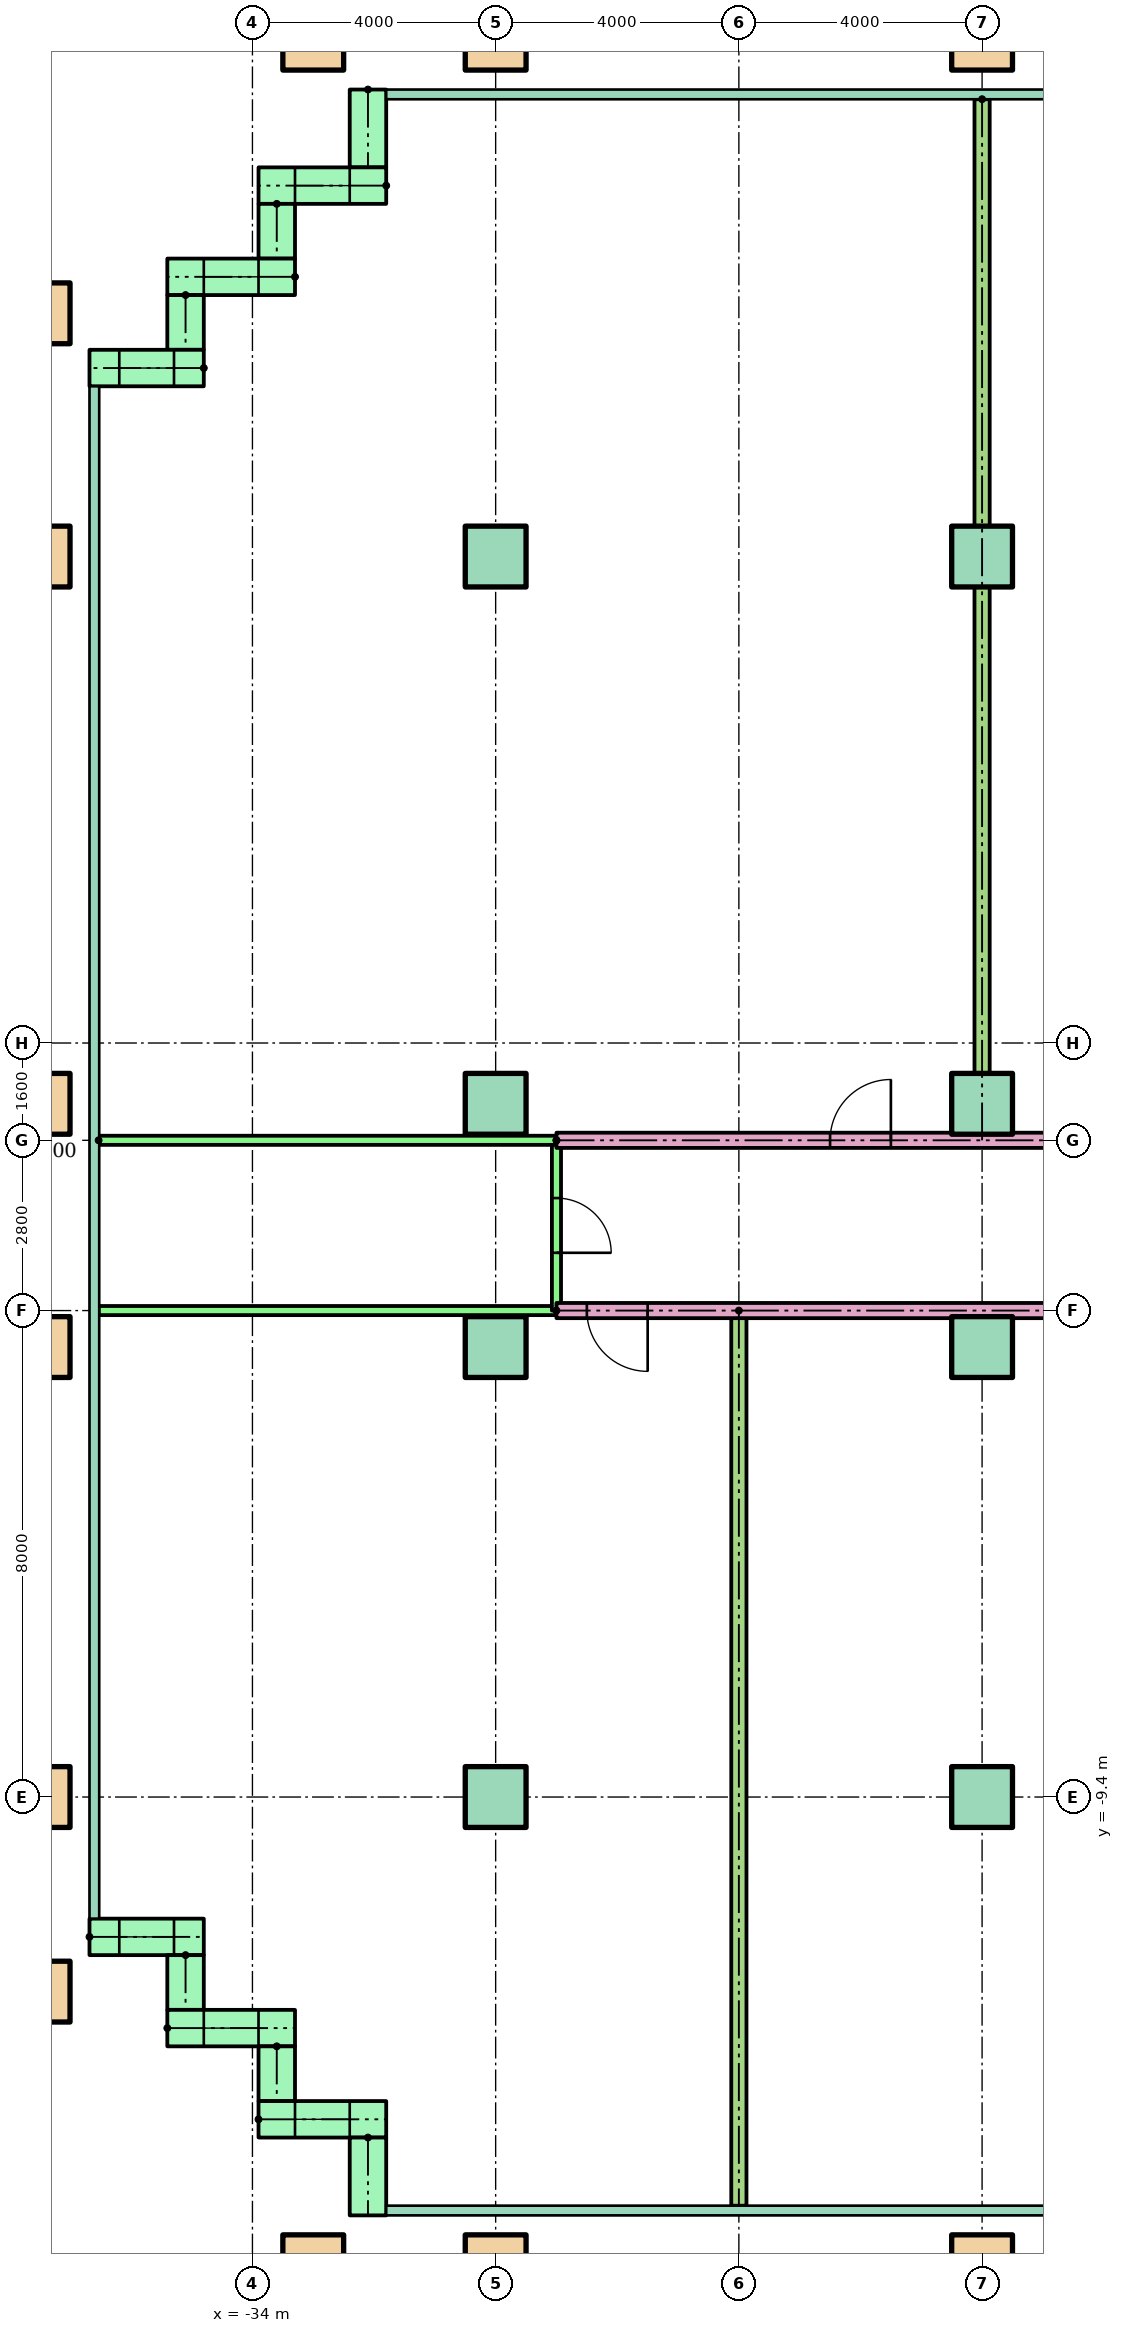
"""IFC4 building model, lengths in metres.
Left out: names, types, materials, properties, quantities, classifications, styles, units other than length and angle.
Written with IfcOpenShell. Run it as: python <this file> out.ifc"""

import sys

from ifc_helpers import new_model, si_unit, direction, frame, frame_2d, origin, origin_2d, place, context, subcontext, project, spatial, rectangle, hollow_rectangle, extrude, element, fill, save


model = new_model("IFC4")
c1 = context("Model", 3, precision=1e-05, world=origin(), true_north=direction((0.0, 1.0)))
c2 = subcontext(c1, "Body", "Model", "MODEL_VIEW")
j1 = project(units=[si_unit("LENGTHUNIT", "METRE"), si_unit("PLANEANGLEUNIT", "RADIAN")], contexts=[c1])
p1 = place(None, origin())
s1 = spatial("IfcSite", under=j1, at=p1, CompositionType="ELEMENT")
p2 = place(p1, origin())
s2 = spatial("IfcBuilding", under=s1, at=p2, CompositionType="ELEMENT")
p3 = place(p2, frame((0.0, 0.0, 29.9)))
s3 = spatial("IfcBuildingStorey", under=s2, at=p3, CompositionType="ELEMENT", Elevation=29.9)
for number, where in (
    (1, (-33.0, -17.1, 0.0)),
    (2, (-30.0, -17.1, 0.0)),
    (3, (-22.0, -17.1, 0.0)),
    (4, (-37.5, -12.6, 0.0)),
    (5, (-37.5, -9.4, 0.0)),
):
    element("IfcColumn", number, at=place(p3, frame(where)), inside=s3, PredefinedType="COLUMN", context=c2, shape_type="SweptSolid", body=[
        extrude(hollow_rectangle(XDim=1.0, YDim=1.0, WallThickness=0.05, at=origin_2d()), origin(), (0.0, 0.0, 1.0), 3.9),
    ])
for number, where in (
    (6, (-30.0, -9.4, 0.0)),
    (7, (-22.0, -9.4, 0.0)),
):
    element("IfcColumn", number, at=place(p3, frame(where)), inside=s3, PredefinedType="COLUMN", context=c2, shape_type="SweptSolid", body=[
        extrude(rectangle(XDim=1.0, YDim=1.0, at=origin_2d()), origin(), (0.0, 0.0, 1.0), 3.9),
    ])
p4 = place(p3, frame((-37.5, -2.0, 0.0)))
e8 = element("IfcColumn", 8, at=p4, inside=s3, PredefinedType="COLUMN", context=c2, shape_type="SweptSolid", body=[
    extrude(hollow_rectangle(XDim=1.0, YDim=1.0, WallThickness=0.05, at=origin_2d()), origin(), (0.0, 0.0, 1.0), 3.9),
])
for number, where in (
    (9, (-30.0, -2.0, 0.0)),
    (10, (-22.0, -2.0, 0.0)),
):
    element("IfcColumn", number, at=place(p3, frame(where)), inside=s3, PredefinedType="COLUMN", context=c2, shape_type="SweptSolid", body=[
        extrude(rectangle(XDim=1.0, YDim=1.0, at=origin_2d()), origin(), (0.0, 0.0, 1.0), 3.9),
    ])
p5 = place(p3, frame((-37.5, 2.0, 0.0)))
e11 = element("IfcColumn", 11, at=p5, inside=s3, PredefinedType="COLUMN", context=c2, shape_type="SweptSolid", body=[
    extrude(hollow_rectangle(XDim=1.0, YDim=1.0, WallThickness=0.05, at=origin_2d()), origin(), (0.0, 0.0, 1.0), 3.9),
])
for number, where in (
    (12, (-30.0, 2.0, 0.0)),
    (13, (-22.0, 2.0, 0.0)),
):
    element("IfcColumn", number, at=place(p3, frame(where)), inside=s3, PredefinedType="COLUMN", context=c2, shape_type="SweptSolid", body=[
        extrude(rectangle(XDim=1.0, YDim=1.0, at=origin_2d()), origin(), (0.0, 0.0, 1.0), 3.9),
    ])
p6 = place(p3, frame((-37.5, 11.0, 0.0)))
e14 = element("IfcColumn", 14, at=p6, inside=s3, PredefinedType="COLUMN", context=c2, shape_type="SweptSolid", body=[
    extrude(hollow_rectangle(XDim=1.0, YDim=1.0, WallThickness=0.05, at=origin_2d()), origin(), (0.0, 0.0, 1.0), 3.9),
])
for number, where in (
    (15, (-30.0, 11.0, 0.0)),
    (16, (-22.0, 11.0, 0.0)),
):
    element("IfcColumn", number, at=place(p3, frame(where)), inside=s3, PredefinedType="COLUMN", context=c2, shape_type="SweptSolid", body=[
        extrude(rectangle(XDim=1.0, YDim=1.0, at=origin_2d()), origin(), (0.0, 0.0, 1.0), 3.9),
    ])
for number, where in (
    (17, (-37.5, 15.0, 0.0)),
    (18, (-33.0, 19.5, 0.0)),
    (19, (-30.0, 19.5, 0.0)),
    (20, (-22.0, 19.5, 0.0)),
):
    element("IfcColumn", number, at=place(p3, frame(where)), inside=s3, PredefinedType="COLUMN", context=c2, shape_type="SweptSolid", body=[
        extrude(hollow_rectangle(XDim=1.0, YDim=1.0, WallThickness=0.05, at=origin_2d()), origin(), (0.0, 0.0, 1.0), 3.9),
    ])
p7 = place(p3, frame((-32.1, 18.68, 0.0), z_axis=(0.0, 0.0, 1.0), x_axis=(0.0, -1.0, 0.0)))
e21 = element("IfcWall", 21, at=p7, inside=s3, PredefinedType="STANDARD", context=c2, shape_type="SweptSolid", body=[
    extrude(rectangle(XDim=1.28, YDim=0.6, at=frame_2d((0.64, 0.0))), origin(), (0.0, 0.0, 1.0), 3.6),
])
p8 = place(p3, frame((-31.8, 17.1, 0.0), z_axis=(0.0, 0.0, 1.0), x_axis=(-1.0, 0.0, 0.0)))
e22 = element("IfcWall", 22, at=p8, inside=s3, PredefinedType="STANDARD", context=c2, shape_type="SweptSolid", body=[
    extrude(rectangle(XDim=2.1, YDim=0.6, at=frame_2d((1.05, 0.0))), origin(), (0.0, 0.0, 1.0), 3.6),
])
p9 = place(p8, frame((0.6, 0.0, 0.9)))
e23 = element("IfcOpeningElement", 23, at=p9, cuts=e22, PredefinedType="OPENING", context=c2, shape_type="SweptSolid", body=[
    extrude(rectangle(XDim=0.9, YDim=1.8, at=frame_2d((0.45, 0.9))), frame((0.0, 0.31, 0.0), z_axis=(0.0, -1.0, 0.0), x_axis=(1.0, 0.0, 0.0)), (0.0, 0.0, 1.0), 0.62),
])
p10 = place(p3, frame((-33.6, 16.8, 0.0), z_axis=(0.0, 0.0, 1.0), x_axis=(0.0, -1.0, 0.0)))
e24 = element("IfcWall", 24, at=p10, inside=s3, PredefinedType="STANDARD", context=c2, shape_type="SweptSolid", body=[
    extrude(rectangle(XDim=0.9, YDim=0.6, at=frame_2d((0.45, 0.0))), origin(), (0.0, 0.0, 1.0), 3.6),
])
p11 = place(p3, frame((-33.3, 15.6, 0.0), z_axis=(0.0, 0.0, 1.0), x_axis=(-1.0, 0.0, 0.0)))
e25 = element("IfcWall", 25, at=p11, inside=s3, PredefinedType="STANDARD", context=c2, shape_type="SweptSolid", body=[
    extrude(rectangle(XDim=2.1, YDim=0.6, at=frame_2d((1.05, 0.0))), origin(), (0.0, 0.0, 1.0), 3.6),
])
p12 = place(p11, frame((0.6, 0.0, 0.9)))
e26 = element("IfcOpeningElement", 26, at=p12, cuts=e25, PredefinedType="OPENING", context=c2, shape_type="SweptSolid", body=[
    extrude(rectangle(XDim=0.9, YDim=1.8, at=frame_2d((0.45, 0.9))), frame((0.0, 0.31, 0.0), z_axis=(0.0, -1.0, 0.0), x_axis=(1.0, 0.0, 0.0)), (0.0, 0.0, 1.0), 0.62),
])
p13 = place(p3, frame((-35.1, 15.3, 0.0), z_axis=(0.0, 0.0, 1.0), x_axis=(0.0, -1.0, 0.0)))
e27 = element("IfcWall", 27, at=p13, inside=s3, PredefinedType="STANDARD", context=c2, shape_type="SweptSolid", body=[
    extrude(rectangle(XDim=0.9, YDim=0.6, at=frame_2d((0.45, 0.0))), origin(), (0.0, 0.0, 1.0), 3.6),
])
p14 = place(p3, frame((-34.8, 14.1, 0.0), z_axis=(0.0, 0.0, 1.0), x_axis=(-1.0, 0.0, 0.0)))
e28 = element("IfcWall", 28, at=p14, inside=s3, PredefinedType="STANDARD", context=c2, shape_type="SweptSolid", body=[
    extrude(rectangle(XDim=1.88, YDim=0.6, at=frame_2d((0.94, 0.0))), origin(), (0.0, 0.0, 1.0), 3.6),
])
p15 = place(p14, frame((0.49, 0.0, 0.9)))
e29 = element("IfcOpeningElement", 29, at=p15, cuts=e28, PredefinedType="OPENING", context=c2, shape_type="SweptSolid", body=[
    extrude(rectangle(XDim=0.9, YDim=1.8, at=frame_2d((0.45, 0.9))), frame((0.0, 0.31, 0.0), z_axis=(0.0, -1.0, 0.0), x_axis=(1.0, 0.0, 0.0)), (0.0, 0.0, 1.0), 0.62),
])
p16 = place(p3, frame((-36.68, -11.7, 0.0)))
e30 = element("IfcWall", 30, at=p16, inside=s3, PredefinedType="STANDARD", context=c2, shape_type="SweptSolid", body=[
    extrude(rectangle(XDim=1.88, YDim=0.6, at=frame_2d((0.94, 0.0))), origin(), (0.0, 0.0, 1.0), 3.6),
])
p17 = place(p16, frame((0.49, 0.0, 0.9)))
e31 = element("IfcOpeningElement", 31, at=p17, cuts=e30, PredefinedType="OPENING", context=c2, shape_type="SweptSolid", body=[
    extrude(rectangle(XDim=0.9, YDim=1.8, at=frame_2d((0.45, 0.9))), frame((0.0, 0.31, 0.0), z_axis=(0.0, -1.0, 0.0), x_axis=(1.0, 0.0, 0.0)), (0.0, 0.0, 1.0), 0.62),
])
p18 = place(p3, frame((-35.1, -12.0, 0.0), z_axis=(0.0, 0.0, 1.0), x_axis=(0.0, -1.0, 0.0)))
e32 = element("IfcWall", 32, at=p18, inside=s3, PredefinedType="STANDARD", context=c2, shape_type="SweptSolid", body=[
    extrude(rectangle(XDim=0.9, YDim=0.6, at=frame_2d((0.45, 0.0))), origin(), (0.0, 0.0, 1.0), 3.6),
])
p19 = place(p3, frame((-35.4, -13.2, 0.0)))
e33 = element("IfcWall", 33, at=p19, inside=s3, PredefinedType="STANDARD", context=c2, shape_type="SweptSolid", body=[
    extrude(rectangle(XDim=2.1, YDim=0.6, at=frame_2d((1.05, 0.0))), origin(), (0.0, 0.0, 1.0), 3.6),
])
p20 = place(p19, frame((0.6, 0.0, 0.9)))
e34 = element("IfcOpeningElement", 34, at=p20, cuts=e33, PredefinedType="OPENING", context=c2, shape_type="SweptSolid", body=[
    extrude(rectangle(XDim=0.9, YDim=1.8, at=frame_2d((0.45, 0.9))), frame((0.0, 0.31, 0.0), z_axis=(0.0, -1.0, 0.0), x_axis=(1.0, 0.0, 0.0)), (0.0, 0.0, 1.0), 0.62),
])
p21 = place(p3, frame((-33.6, -13.5, 0.0), z_axis=(0.0, 0.0, 1.0), x_axis=(0.0, -1.0, 0.0)))
e35 = element("IfcWall", 35, at=p21, inside=s3, PredefinedType="STANDARD", context=c2, shape_type="SweptSolid", body=[
    extrude(rectangle(XDim=0.9, YDim=0.6, at=frame_2d((0.45, 0.0))), origin(), (0.0, 0.0, 1.0), 3.6),
])
p22 = place(p3, frame((-33.9, -14.7, 0.0)))
e36 = element("IfcWall", 36, at=p22, inside=s3, PredefinedType="STANDARD", context=c2, shape_type="SweptSolid", body=[
    extrude(rectangle(XDim=2.1, YDim=0.6, at=frame_2d((1.05, 0.0))), origin(), (0.0, 0.0, 1.0), 3.6),
])
p23 = place(p22, frame((0.6, 0.0, 0.9)))
e37 = element("IfcOpeningElement", 37, at=p23, cuts=e36, PredefinedType="OPENING", context=c2, shape_type="SweptSolid", body=[
    extrude(rectangle(XDim=0.9, YDim=1.8, at=frame_2d((0.45, 0.9))), frame((0.0, 0.31, 0.0), z_axis=(0.0, -1.0, 0.0), x_axis=(1.0, 0.0, 0.0)), (0.0, 0.0, 1.0), 0.62),
])
p24 = place(p3, frame((-32.1, -15.0, 0.0), z_axis=(0.0, 0.0, 1.0), x_axis=(0.0, -1.0, 0.0)))
e38 = element("IfcWall", 38, at=p24, inside=s3, PredefinedType="STANDARD", context=c2, shape_type="SweptSolid", body=[
    extrude(rectangle(XDim=1.28, YDim=0.6, at=frame_2d((0.64, 0.0))), origin(), (0.0, 0.0, 1.0), 3.6),
])
p25 = place(p3, frame((-14.0, -1.4, 0.0), z_axis=(0.0, 0.0, 1.0), x_axis=(-1.0, 0.0, 0.0)))
e39 = element("IfcWall", 39, at=p25, inside=s3, PredefinedType="PARTITIONING", context=c2, shape_type="SweptSolid", body=[
    extrude(rectangle(XDim=15.0, YDim=0.25, at=frame_2d((7.5, 0.0))), origin(), (0.0, 0.0, 1.0), 3.1),
])
p26 = place(p25, frame((0.555, 0.0, 0.0)))
e40 = element("IfcOpeningElement", 40, at=p26, cuts=e39, PredefinedType="OPENING", context=c2, shape_type="SweptSolid", body=[
    extrude(rectangle(XDim=0.9, YDim=2.1, at=frame_2d((0.45, 1.05))), frame((0.0, 0.135, 0.0), z_axis=(0.0, -1.0, 0.0), x_axis=(1.0, 0.0, 0.0)), (0.0, 0.0, 1.0), 0.27),
])
p27 = place(p25, frame((5.5, 0.0, 0.0)))
e41 = element("IfcOpeningElement", 41, at=p27, cuts=e39, PredefinedType="OPENING", context=c2, shape_type="SweptSolid", body=[
    extrude(rectangle(XDim=1.0, YDim=2.1, at=frame_2d((0.5, 1.05))), frame((0.0, 0.135, 0.0), z_axis=(0.0, -1.0, 0.0), x_axis=(1.0, 0.0, 0.0)), (0.0, 0.0, 1.0), 0.27),
])
p28 = place(p25, frame((13.5, 0.0, 0.0)))
e42 = element("IfcOpeningElement", 42, at=p28, cuts=e39, PredefinedType="OPENING", context=c2, shape_type="SweptSolid", body=[
    extrude(rectangle(XDim=1.0, YDim=2.1, at=frame_2d((0.5, 1.05))), frame((0.0, 0.135, 0.0), z_axis=(0.0, -1.0, 0.0), x_axis=(1.0, 0.0, 0.0)), (0.0, 0.0, 1.0), 0.27),
])
p29 = place(p3, frame((-29.0, -1.4, 0.0), z_axis=(0.0, 0.0, 1.0), x_axis=(-1.0, 0.0, 0.0)))
e43 = element("IfcWall", 43, at=p29, inside=s3, PredefinedType="PARTITIONING", context=c2, shape_type="SweptSolid", body=[
    extrude(rectangle(XDim=7.53, YDim=0.15, at=frame_2d((3.765, 0.0))), origin(), (0.0, 0.0, 1.0), 3.1),
])
p30 = place(p3, frame((-29.0, 1.4, 0.0), z_axis=(0.0, 0.0, 1.0), x_axis=(0.0, -1.0, 0.0)))
e44 = element("IfcWall", 44, at=p30, inside=s3, PredefinedType="PARTITIONING", context=c2, shape_type="SweptSolid", body=[
    extrude(rectangle(XDim=2.8, YDim=0.15, at=frame_2d((1.4, 0.0))), origin(), (0.0, 0.0, 1.0), 3.1),
])
p31 = place(p30, frame((0.95, 0.0, 0.0)))
e45 = element("IfcOpeningElement", 45, at=p31, cuts=e44, PredefinedType="OPENING", context=c2, shape_type="SweptSolid", body=[
    extrude(rectangle(XDim=0.9, YDim=2.1, at=frame_2d((0.45, 1.05))), frame((0.0, 0.085, 0.0), z_axis=(0.0, -1.0, 0.0), x_axis=(1.0, 0.0, 0.0)), (0.0, 0.0, 1.0), 0.17),
])
p32 = place(p3, frame((-26.0, -1.4, 0.0), z_axis=(0.0, 0.0, 1.0), x_axis=(0.0, -1.0, 0.0)))
e46 = element("IfcWall", 46, at=p32, inside=s3, PredefinedType="PARTITIONING", context=c2, shape_type="SweptSolid", body=[
    extrude(rectangle(XDim=14.721, YDim=0.25, at=frame_2d((7.361, 0.0))), origin(), (0.0, 0.0, 1.0), 3.1),
])
p33 = place(p3, frame((-29.0, 1.4, 0.0)))
e47 = element("IfcWall", 47, at=p33, inside=s3, PredefinedType="PARTITIONING", context=c2, shape_type="SweptSolid", body=[
    extrude(rectangle(XDim=15.0, YDim=0.25, at=frame_2d((7.5, 0.0))), origin(), (0.0, 0.0, 1.0), 3.1),
])
p34 = place(p33, frame((12.5, 0.0, 0.0)))
e48 = element("IfcOpeningElement", 48, at=p34, cuts=e47, PredefinedType="OPENING", context=c2, shape_type="SweptSolid", body=[
    extrude(rectangle(XDim=1.0, YDim=2.1, at=frame_2d((0.5, 1.05))), frame((0.0, 0.135, 0.0), z_axis=(0.0, -1.0, 0.0), x_axis=(1.0, 0.0, 0.0)), (0.0, 0.0, 1.0), 0.27),
])
p35 = place(p33, frame((4.5, 0.0, 0.0)))
e49 = element("IfcOpeningElement", 49, at=p35, cuts=e47, PredefinedType="OPENING", context=c2, shape_type="SweptSolid", body=[
    extrude(rectangle(XDim=1.0, YDim=2.1, at=frame_2d((0.5, 1.05))), frame((0.0, 0.135, 0.0), z_axis=(0.0, -1.0, 0.0), x_axis=(1.0, 0.0, 0.0)), (0.0, 0.0, 1.0), 0.27),
])
p36 = place(p3, frame((-36.53, 1.4, 0.0)))
e50 = element("IfcWall", 50, at=p36, inside=s3, PredefinedType="PARTITIONING", context=c2, shape_type="SweptSolid", body=[
    extrude(rectangle(XDim=7.53, YDim=0.15, at=frame_2d((3.765, 0.0))), origin(), (0.0, 0.0, 1.0), 3.1),
])
p37 = place(p3, frame((-22.0, 18.521, 0.0), z_axis=(0.0, 0.0, 1.0), x_axis=(0.0, -1.0, 0.0)))
e51 = element("IfcWall", 51, at=p37, inside=s3, PredefinedType="PARTITIONING", context=c2, shape_type="SweptSolid", body=[
    extrude(rectangle(XDim=17.121, YDim=0.25, at=frame_2d((8.561, 0.0))), origin(), (0.0, 0.0, 1.0), 3.1),
])
p38 = place(p9, origin())
e52 = element("IfcWindow", 52, at=p38, inside=s3, PartitioningType="SINGLE_PANEL", PredefinedType="WINDOW", context=c2, shape_type="SweptSolid", body=[
    extrude(rectangle(XDim=0.9, YDim=1.8, at=frame_2d((0.45, 0.9))), frame((0.0, 0.03, 0.0), z_axis=(0.0, -1.0, 0.0), x_axis=(1.0, 0.0, 0.0)), (0.0, 0.0, 1.0), 0.06),
])
fill(e23, e52)
p39 = place(p12, origin())
e53 = element("IfcWindow", 53, at=p39, inside=s3, PartitioningType="SINGLE_PANEL", PredefinedType="WINDOW", context=c2, shape_type="SweptSolid", body=[
    extrude(rectangle(XDim=0.9, YDim=1.8, at=frame_2d((0.45, 0.9))), frame((0.0, 0.03, 0.0), z_axis=(0.0, -1.0, 0.0), x_axis=(1.0, 0.0, 0.0)), (0.0, 0.0, 1.0), 0.06),
])
fill(e26, e53)
p40 = place(p15, origin())
e54 = element("IfcWindow", 54, at=p40, inside=s3, PartitioningType="SINGLE_PANEL", PredefinedType="WINDOW", context=c2, shape_type="SweptSolid", body=[
    extrude(rectangle(XDim=0.9, YDim=1.8, at=frame_2d((0.45, 0.9))), frame((0.0, 0.03, 0.0), z_axis=(0.0, -1.0, 0.0), x_axis=(1.0, 0.0, 0.0)), (0.0, 0.0, 1.0), 0.06),
])
fill(e29, e54)
p41 = place(p17, origin())
e55 = element("IfcWindow", 55, at=p41, inside=s3, PartitioningType="SINGLE_PANEL", PredefinedType="WINDOW", context=c2, shape_type="SweptSolid", body=[
    extrude(rectangle(XDim=0.9, YDim=1.8, at=frame_2d((0.45, 0.9))), frame((0.0, 0.03, 0.0), z_axis=(0.0, -1.0, 0.0), x_axis=(1.0, 0.0, 0.0)), (0.0, 0.0, 1.0), 0.06),
])
fill(e31, e55)
p42 = place(p20, origin())
e56 = element("IfcWindow", 56, at=p42, inside=s3, PartitioningType="SINGLE_PANEL", PredefinedType="WINDOW", context=c2, shape_type="SweptSolid", body=[
    extrude(rectangle(XDim=0.9, YDim=1.8, at=frame_2d((0.45, 0.9))), frame((0.0, 0.03, 0.0), z_axis=(0.0, -1.0, 0.0), x_axis=(1.0, 0.0, 0.0)), (0.0, 0.0, 1.0), 0.06),
])
fill(e34, e56)
p43 = place(p23, origin())
e57 = element("IfcWindow", 57, at=p43, inside=s3, PartitioningType="SINGLE_PANEL", PredefinedType="WINDOW", context=c2, shape_type="SweptSolid", body=[
    extrude(rectangle(XDim=0.9, YDim=1.8, at=frame_2d((0.45, 0.9))), frame((0.0, 0.03, 0.0), z_axis=(0.0, -1.0, 0.0), x_axis=(1.0, 0.0, 0.0)), (0.0, 0.0, 1.0), 0.06),
])
fill(e37, e57)
p44 = place(p28, origin())
e58 = element("IfcDoor", 58, at=p44, inside=s3, OperationType="SINGLE_SWING_LEFT", PredefinedType="DOOR", context=c2, shape_type="SweptSolid", body=[
    extrude(rectangle(XDim=1.0, YDim=2.1, at=frame_2d((0.5, 1.05))), frame((0.0, 0.025, 0.0), z_axis=(0.0, -1.0, 0.0), x_axis=(1.0, 0.0, 0.0)), (0.0, 0.0, 1.0), 0.05),
])
fill(e42, e58)
p45 = place(p31, origin())
e59 = element("IfcDoor", 59, at=p45, inside=s3, OperationType="SINGLE_SWING_RIGHT", PredefinedType="DOOR", context=c2, shape_type="SweptSolid", body=[
    extrude(rectangle(XDim=0.9, YDim=2.1, at=frame_2d((0.45, 1.05))), frame((0.0, 0.025, 0.0), z_axis=(0.0, -1.0, 0.0), x_axis=(1.0, 0.0, 0.0)), (0.0, 0.0, 1.0), 0.05),
])
fill(e45, e59)
p46 = place(p35, origin())
e60 = element("IfcDoor", 60, at=p46, inside=s3, OperationType="SINGLE_SWING_RIGHT", PredefinedType="DOOR", context=c2, shape_type="SweptSolid", body=[
    extrude(rectangle(XDim=1.0, YDim=2.1, at=frame_2d((0.5, 1.05))), frame((0.0, 0.025, 0.0), z_axis=(0.0, -1.0, 0.0), x_axis=(1.0, 0.0, 0.0)), (0.0, 0.0, 1.0), 0.05),
])
fill(e49, e60)
save(model, sys.argv[1])
